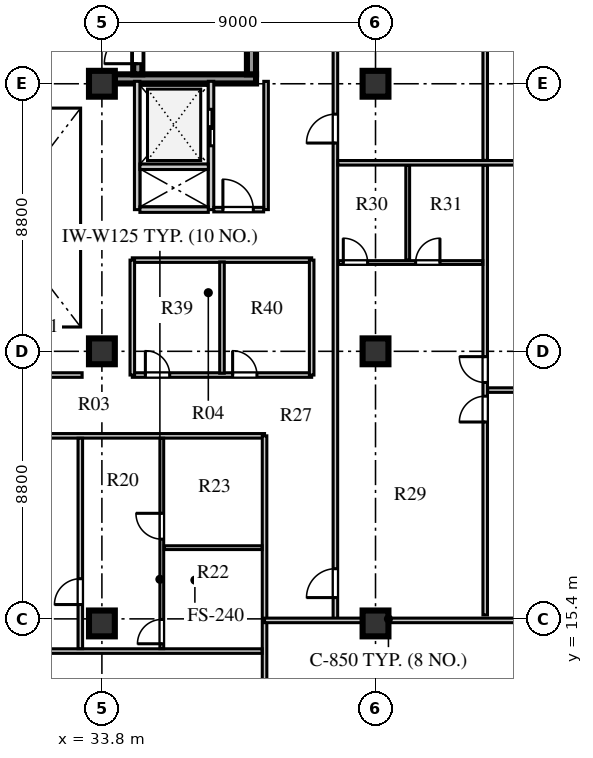
"""IFC4 building model, lengths in metres.
Left out: names, types, materials, properties, quantities, classifications, styles, units other than length and angle.
Written with IfcOpenShell. Run it as: python <this file> out.ifc"""

import sys

from ifc_helpers import new_model, si_unit, direction, frame, frame_2d, origin, origin_2d, place, context, subcontext, project, spatial, rectangle, extrude, element, fill, save


model = new_model("IFC4")
c1 = context("Model", 3, precision=1e-05, world=origin(), true_north=direction((0.0, 1.0)))
c2 = subcontext(c1, "Body", "Model", "MODEL_VIEW")
j1 = project(units=[si_unit("LENGTHUNIT", "METRE"), si_unit("PLANEANGLEUNIT", "RADIAN")], contexts=[c1])
p1 = place(None, origin())
s1 = spatial("IfcSite", under=j1, at=p1, CompositionType="ELEMENT")
p2 = place(p1, origin())
s2 = spatial("IfcBuilding", under=s1, at=p2, CompositionType="ELEMENT")
p3 = place(p2, frame((0.0, 0.0, 245.3)))
s3 = spatial("IfcBuildingStorey", under=s2, at=p3, CompositionType="ELEMENT", Elevation=245.3)
p4 = place(p3, frame((34.225, 33.16, 0.0), z_axis=(0.0, 0.0, 1.0), x_axis=(1.0, 0.0, 0.0)))
e1 = element("IfcWall", 1, at=p4, inside=s3, PredefinedType="SHEAR", context=c2, shape_type="SweptSolid", body=[
    extrude(rectangle(XDim=4.645, YDim=0.3, at=frame_2d((2.323, 0.0))), origin(), (0.0, 0.0, 1.0), 3.66),
])
p5 = place(p3, frame((34.98, 33.31, 0.0), z_axis=(0.0, 0.0, 1.0), x_axis=(0.0, 1.0, 0.0)))
e2 = element("IfcWall", 2, at=p5, inside=s3, PredefinedType="SHEAR", context=c2, shape_type="SweptSolid", body=[
    extrude(rectangle(XDim=8.03, YDim=0.3, at=frame_2d((4.015, 0.0))), origin(), (0.0, 0.0, 1.0), 3.66),
])
p6 = place(p5, frame((0.35, 0.0, 0.0)))
e3 = element("IfcOpeningElement", 3, at=p6, cuts=e2, PredefinedType="OPENING", context=c2, shape_type="SweptSolid", body=[
    extrude(rectangle(XDim=1.1, YDim=2.1, at=frame_2d((0.55, 1.05))), frame((0.0, 0.16, 0.0), z_axis=(0.0, -1.0, 0.0), x_axis=(1.0, 0.0, 0.0)), (0.0, 0.0, 1.0), 0.32),
])
p7 = place(p3, frame((38.72, 33.31, 0.0), z_axis=(0.0, 0.0, 1.0), x_axis=(0.0, 1.0, 0.0)))
e4 = element("IfcWall", 4, at=p7, inside=s3, PredefinedType="SHEAR", context=c2, shape_type="SweptSolid", body=[
    extrude(rectangle(XDim=8.03, YDim=0.3, at=frame_2d((4.015, 0.0))), origin(), (0.0, 0.0, 1.0), 3.66),
])
for number, where, z_axis, x_axis in (
    (5, (33.8, 15.25, 0.0), (0.0, 0.0, 1.0), (1.0, 0.0, 0.0)),
    (6, (33.8, 24.2, 0.0), (0.0, 0.0, 1.0), (1.0, 0.0, 0.0)),
    (7, (33.8, 33.0, 0.0), (0.0, 0.0, 1.0), (1.0, 0.0, 0.0)),
    (8, (42.8, 15.25, 0.0), (0.0, 0.0, 1.0), (1.0, 0.0, 0.0)),
    (9, (42.8, 24.2, 0.0), (0.0, 0.0, 1.0), (1.0, 0.0, 0.0)),
    (10, (42.8, 33.0, 0.0), (0.0, 0.0, 1.0), (1.0, 0.0, 0.0)),
):
    element("IfcColumn", number, at=place(p3, frame(where, z_axis=z_axis, x_axis=x_axis)), inside=s3, PredefinedType="COLUMN", context=c2, shape_type="SweptSolid", body=[
        extrude(rectangle(XDim=0.85, YDim=0.85, at=origin_2d()), origin(), (0.0, 0.0, 1.0), 3.66),
    ])
p8 = place(p3, frame((34.96, 28.86, 0.0), z_axis=(0.0, 0.0, 1.0), x_axis=(0.0, 1.0, 0.0)))
e11 = element("IfcWall", 11, at=p8, inside=s3, PredefinedType="SOLIDWALL", context=c2, shape_type="SweptSolid", body=[
    extrude(rectangle(XDim=4.22, YDim=0.18, at=frame_2d((2.11, 0.0))), origin(), (0.0, 0.0, 1.0), 3.66),
])
p9 = place(p3, frame((37.39, 28.86, 0.0), z_axis=(0.0, 0.0, 1.0), x_axis=(0.0, 1.0, 0.0)))
e12 = element("IfcWall", 12, at=p9, inside=s3, PredefinedType="SOLIDWALL", context=c2, shape_type="SweptSolid", body=[
    extrude(rectangle(XDim=4.22, YDim=0.18, at=frame_2d((2.11, 0.0))), origin(), (0.0, 0.0, 1.0), 3.66),
])
p10 = place(p9, frame((2.1, 0.0, 0.0)))
e13 = element("IfcOpeningElement", 13, at=p10, cuts=e12, PredefinedType="OPENING", context=c2, shape_type="SweptSolid", body=[
    extrude(rectangle(XDim=1.2, YDim=2.12, at=frame_2d((0.6, 1.06))), frame((0.0, 0.1, 0.0), z_axis=(0.0, -1.0, 0.0), x_axis=(1.0, 0.0, 0.0)), (0.0, 0.0, 1.0), 0.2),
])
for number, where, z_axis, x_axis in (
    (14, (35.05, 28.86, 0.0), (0.0, 0.0, 1.0), (1.0, 0.0, 0.0)),
    (15, (35.05, 30.27, 0.0), (0.0, 0.0, 1.0), (1.0, 0.0, 0.0)),
):
    element("IfcWall", number, at=place(p3, frame(where, z_axis=z_axis, x_axis=x_axis)), inside=s3, PredefinedType="SOLIDWALL", context=c2, shape_type="SweptSolid", body=[
        extrude(rectangle(XDim=2.25, YDim=0.18, at=frame_2d((1.125, 0.0))), origin(), (0.0, 0.0, 1.0), 3.66),
    ])
p11 = place(p3, frame((39.2, 28.86, 0.0), z_axis=(0.0, 0.0, 1.0), x_axis=(0.0, 1.0, 0.0)))
e16 = element("IfcWall", 16, at=p11, inside=s3, PredefinedType="PARTITIONING", context=c2, shape_type="SweptSolid", body=[
    extrude(rectangle(XDim=4.22, YDim=0.15, at=frame_2d((2.11, 0.0))), origin(), (0.0, 0.0, 1.0), 3.66),
])
p12 = place(p3, frame((37.48, 28.86, 0.0), z_axis=(0.0, 0.0, 1.0), x_axis=(1.0, 0.0, 0.0)))
e17 = element("IfcWall", 17, at=p12, inside=s3, PredefinedType="PARTITIONING", context=c2, shape_type="SweptSolid", body=[
    extrude(rectangle(XDim=1.64, YDim=0.15, at=frame_2d((0.82, 0.0))), origin(), (0.0, 0.0, 1.0), 3.66),
])
p13 = place(p12, frame((0.3, 0.0, 0.0)))
e18 = element("IfcOpeningElement", 18, at=p13, cuts=e17, PredefinedType="OPENING", context=c2, shape_type="SweptSolid", body=[
    extrude(rectangle(XDim=1.0, YDim=2.1, at=frame_2d((0.5, 1.05))), frame((0.0, 0.085, 0.0), z_axis=(0.0, -1.0, 0.0), x_axis=(1.0, 0.0, 0.0)), (0.0, 0.0, 1.0), 0.17),
])
p14 = place(p3, frame((27.08, 21.42, 0.0), z_axis=(0.0, 0.0, 1.0), x_axis=(1.0, 0.0, 0.0)))
e19 = element("IfcWall", 19, at=p14, inside=s3, PredefinedType="PARTITIONING", context=c2, shape_type="SweptSolid", body=[
    extrude(rectangle(XDim=12.07, YDim=0.15, at=frame_2d((6.035, 0.0))), origin(), (0.0, 0.0, 1.0), 3.31),
])
p15 = place(p14, frame((0.63, 0.0, 0.0)))
e20 = element("IfcOpeningElement", 20, at=p15, cuts=e19, PredefinedType="OPENING", context=c2, shape_type="SweptSolid", body=[
    extrude(rectangle(XDim=0.95, YDim=2.1, at=frame_2d((0.475, 1.05))), frame((0.0, 0.085, 0.0), z_axis=(0.0, -1.0, 0.0), x_axis=(1.0, 0.0, 0.0)), (0.0, 0.0, 1.0), 0.17),
])
p16 = place(p3, frame((27.15, 23.42, 0.0), z_axis=(0.0, 0.0, 1.0), x_axis=(1.0, 0.0, 0.0)))
e21 = element("IfcWall", 21, at=p16, inside=s3, PredefinedType="PARTITIONING", context=c2, shape_type="SweptSolid", body=[
    extrude(rectangle(XDim=6.0, YDim=0.15, at=frame_2d((3.0, 0.0))), origin(), (0.0, 0.0, 1.0), 3.66),
])
p17 = place(p3, frame((39.15, 7.88, 0.0), z_axis=(0.0, 0.0, 1.0), x_axis=(0.0, 1.0, 0.0)))
e22 = element("IfcWall", 22, at=p17, inside=s3, PredefinedType="PARTITIONING", context=c2, shape_type="SweptSolid", body=[
    extrude(rectangle(XDim=13.54, YDim=0.15, at=frame_2d((6.77, 0.0))), origin(), (0.0, 0.0, 1.0), 3.66),
])
p18 = place(p3, frame((27.24, 14.341, 0.0), z_axis=(0.0, 0.0, 1.0), x_axis=(1.0, 0.0, 0.0)))
e23 = element("IfcWall", 23, at=p18, inside=s3, PredefinedType="PARTITIONING", context=c2, shape_type="SweptSolid", body=[
    extrude(rectangle(XDim=11.83, YDim=0.15, at=frame_2d((5.915, 0.0))), origin(), (0.0, 0.0, 1.0), 3.66),
])
p19 = place(p18, frame((0.3, 0.0, 0.0)))
e24 = element("IfcOpeningElement", 24, at=p19, cuts=e23, PredefinedType="OPENING", context=c2, shape_type="SweptSolid", body=[
    extrude(rectangle(XDim=0.85, YDim=2.08, at=frame_2d((0.425, 1.04))), frame((0.0, 0.085, 0.0), z_axis=(0.0, -1.0, 0.0), x_axis=(1.0, 0.0, 0.0)), (0.0, 0.0, 1.0), 0.17),
])
p20 = place(p18, frame((3.135, 0.0, 0.0)))
e25 = element("IfcOpeningElement", 25, at=p20, cuts=e23, PredefinedType="OPENING", context=c2, shape_type="SweptSolid", body=[
    extrude(rectangle(XDim=0.85, YDim=2.08, at=frame_2d((0.425, 1.04))), frame((0.0, 0.085, 0.0), z_axis=(0.0, -1.0, 0.0), x_axis=(1.0, 0.0, 0.0)), (0.0, 0.0, 1.0), 0.17),
])
p21 = place(p3, frame((35.77, 14.421, 0.0), z_axis=(0.0, 0.0, 1.0), x_axis=(0.0, 1.0, 0.0)))
e26 = element("IfcWall", 26, at=p21, inside=s3, PredefinedType="PLUMBINGWALL", context=c2, shape_type="SweptSolid", body=[
    extrude(rectangle(XDim=6.919, YDim=0.125, at=frame_2d((3.459, 0.0))), origin(), (0.0, 0.0, 1.0), 3.66),
])
p22 = place(p21, frame((0.16, 0.0, 0.0)))
e27 = element("IfcOpeningElement", 27, at=p22, cuts=e26, PredefinedType="OPENING", context=c2, shape_type="SweptSolid", body=[
    extrude(rectangle(XDim=0.8, YDim=2.05, at=frame_2d((0.4, 1.025))), frame((0.0, 0.073, 0.0), z_axis=(0.0, -1.0, 0.0), x_axis=(1.0, 0.0, 0.0)), (0.0, 0.0, 1.0), 0.145),
])
p23 = place(p21, frame((3.601, 0.0, 0.0)))
e28 = element("IfcOpeningElement", 28, at=p23, cuts=e26, PredefinedType="OPENING", context=c2, shape_type="SweptSolid", body=[
    extrude(rectangle(XDim=0.85, YDim=2.08, at=frame_2d((0.425, 1.04))), frame((0.0, 0.073, 0.0), z_axis=(0.0, -1.0, 0.0), x_axis=(1.0, 0.0, 0.0)), (0.0, 0.0, 1.0), 0.145),
])
p24 = place(p3, frame((35.85, 17.742, 0.0), z_axis=(0.0, 0.0, 1.0), x_axis=(1.0, 0.0, 0.0)))
e29 = element("IfcWall", 29, at=p24, inside=s3, PredefinedType="PLUMBINGWALL", context=c2, shape_type="SweptSolid", body=[
    extrude(rectangle(XDim=3.22, YDim=0.125, at=frame_2d((1.61, 0.0))), origin(), (0.0, 0.0, 1.0), 3.66),
])
p25 = place(p3, frame((33.09, 14.421, 0.0), z_axis=(0.0, 0.0, 1.0), x_axis=(0.0, 1.0, 0.0)))
e30 = element("IfcWall", 30, at=p25, inside=s3, PredefinedType="PARTITIONING", context=c2, shape_type="SweptSolid", body=[
    extrude(rectangle(XDim=6.919, YDim=0.15, at=frame_2d((3.459, 0.0))), origin(), (0.0, 0.0, 1.0), 3.66),
])
p26 = place(p25, frame((1.45, 0.0, 0.0)))
e31 = element("IfcOpeningElement", 31, at=p26, cuts=e30, PredefinedType="OPENING", context=c2, shape_type="SweptSolid", body=[
    extrude(rectangle(XDim=0.85, YDim=2.08, at=frame_2d((0.425, 1.04))), frame((0.0, 0.085, 0.0), z_axis=(0.0, -1.0, 0.0), x_axis=(1.0, 0.0, 0.0)), (0.0, 0.0, 1.0), 0.17),
])
p27 = place(p3, frame((41.48, 15.35, 0.0), z_axis=(0.0, 0.0, 1.0), x_axis=(0.0, 1.0, 0.0)))
e32 = element("IfcWall", 32, at=p27, inside=s3, PredefinedType="PARTITIONING", context=c2, shape_type="SweptSolid", body=[
    extrude(rectangle(XDim=26.5, YDim=0.15, at=frame_2d((13.25, 0.0))), origin(), (0.0, 0.0, 1.0), 3.66),
])
p28 = place(p27, frame((0.75, 0.0, 0.0)))
e33 = element("IfcOpeningElement", 33, at=p28, cuts=e32, PredefinedType="OPENING", context=c2, shape_type="SweptSolid", body=[
    extrude(rectangle(XDim=0.95, YDim=2.1, at=frame_2d((0.475, 1.05))), frame((0.0, 0.085, 0.0), z_axis=(0.0, -1.0, 0.0), x_axis=(1.0, 0.0, 0.0)), (0.0, 0.0, 1.0), 0.17),
])
p29 = place(p27, frame((15.7, 0.0, 0.0)))
e34 = element("IfcOpeningElement", 34, at=p29, cuts=e32, PredefinedType="OPENING", context=c2, shape_type="SweptSolid", body=[
    extrude(rectangle(XDim=0.95, YDim=2.1, at=frame_2d((0.475, 1.05))), frame((0.0, 0.085, 0.0), z_axis=(0.0, -1.0, 0.0), x_axis=(1.0, 0.0, 0.0)), (0.0, 0.0, 1.0), 0.17),
])
p30 = place(p3, frame((39.15, 15.35, 0.0), z_axis=(0.0, 0.0, 1.0), x_axis=(1.0, 0.0, 0.0)))
e35 = element("IfcWall", 35, at=p30, inside=s3, PredefinedType="PARTITIONING", context=c2, shape_type="SweptSolid", body=[
    extrude(rectangle(XDim=11.37, YDim=0.15, at=frame_2d((5.685, 0.0))), origin(), (0.0, 0.0, 1.0), 3.06),
])
p31 = place(p3, frame((46.408, 15.53, 0.0), z_axis=(0.0, 0.0, 1.0), x_axis=(0.0, 1.0, 0.0)))
e36 = element("IfcWall", 36, at=p31, inside=s3, PredefinedType="PARTITIONING", context=c2, shape_type="SweptSolid", body=[
    extrude(rectangle(XDim=14.79, YDim=0.15, at=frame_2d((7.395, 0.0))), origin(), (0.0, 0.0, 1.0), 3.66),
])
p32 = place(p31, frame((6.345, 0.0, 0.0)))
e37 = element("IfcOpeningElement", 37, at=p32, cuts=e36, PredefinedType="OPENING", context=c2, shape_type="SweptSolid", body=[
    extrude(rectangle(XDim=0.85, YDim=2.08, at=frame_2d((0.425, 1.04))), frame((0.0, 0.085, 0.0), z_axis=(0.0, -1.0, 0.0), x_axis=(1.0, 0.0, 0.0)), (0.0, 0.0, 1.0), 0.17),
])
p33 = place(p31, frame((7.645, 0.0, 0.0)))
e38 = element("IfcOpeningElement", 38, at=p33, cuts=e36, PredefinedType="OPENING", context=c2, shape_type="SweptSolid", body=[
    extrude(rectangle(XDim=0.85, YDim=2.08, at=frame_2d((0.425, 1.04))), frame((0.0, 0.085, 0.0), z_axis=(0.0, -1.0, 0.0), x_axis=(1.0, 0.0, 0.0)), (0.0, 0.0, 1.0), 0.17),
])
p34 = place(p3, frame((41.58, 27.12, 0.0), z_axis=(0.0, 0.0, 1.0), x_axis=(1.0, 0.0, 0.0)))
e39 = element("IfcWall", 39, at=p34, inside=s3, PredefinedType="PLUMBINGWALL", context=c2, shape_type="SweptSolid", body=[
    extrude(rectangle(XDim=4.748, YDim=0.125, at=frame_2d((2.374, 0.0))), origin(), (0.0, 0.0, 1.0), 3.31),
])
p35 = place(p34, frame((0.16, 0.0, 0.0)))
e40 = element("IfcOpeningElement", 40, at=p35, cuts=e39, PredefinedType="OPENING", context=c2, shape_type="SweptSolid", body=[
    extrude(rectangle(XDim=0.8, YDim=2.05, at=frame_2d((0.4, 1.025))), frame((0.0, 0.073, 0.0), z_axis=(0.0, -1.0, 0.0), x_axis=(1.0, 0.0, 0.0)), (0.0, 0.0, 1.0), 0.145),
])
p36 = place(p34, frame((2.539, 0.0, 0.0)))
e41 = element("IfcOpeningElement", 41, at=p36, cuts=e39, PredefinedType="OPENING", context=c2, shape_type="SweptSolid", body=[
    extrude(rectangle(XDim=0.8, YDim=2.05, at=frame_2d((0.4, 1.025))), frame((0.0, 0.073, 0.0), z_axis=(0.0, -1.0, 0.0), x_axis=(1.0, 0.0, 0.0)), (0.0, 0.0, 1.0), 0.145),
])
p37 = place(p3, frame((43.859, 27.2, 0.0), z_axis=(0.0, 0.0, 1.0), x_axis=(0.0, 1.0, 0.0)))
e42 = element("IfcWall", 42, at=p37, inside=s3, PredefinedType="PLUMBINGWALL", context=c2, shape_type="SweptSolid", body=[
    extrude(rectangle(XDim=3.12, YDim=0.125, at=frame_2d((1.56, 0.0))), origin(), (0.0, 0.0, 1.0), 3.66),
])
p38 = place(p3, frame((46.488, 22.925, 0.0), z_axis=(0.0, 0.0, 1.0), x_axis=(1.0, 0.0, 0.0)))
e43 = element("IfcWall", 43, at=p38, inside=s3, PredefinedType="PARTITIONING", context=c2, shape_type="SweptSolid", body=[
    extrude(rectangle(XDim=4.032, YDim=0.15, at=frame_2d((2.016, 0.0))), origin(), (0.0, 0.0, 1.0), 3.66),
])
p39 = place(p3, frame((41.56, 30.4, 0.0), z_axis=(0.0, 0.0, 1.0), x_axis=(1.0, 0.0, 0.0)))
e44 = element("IfcWall", 44, at=p39, inside=s3, PredefinedType="PARTITIONING", context=c2, shape_type="SweptSolid", body=[
    extrude(rectangle(XDim=8.96, YDim=0.15, at=frame_2d((4.48, 0.0))), origin(), (0.0, 0.0, 1.0), 3.66),
])
p40 = place(p3, frame((46.408, 30.48, 0.0), z_axis=(0.0, 0.0, 1.0), x_axis=(0.0, 1.0, 0.0)))
e45 = element("IfcWall", 45, at=p40, inside=s3, PredefinedType="PARTITIONING", context=c2, shape_type="SweptSolid", body=[
    extrude(rectangle(XDim=11.19, YDim=0.15, at=frame_2d((5.595, 0.0))), origin(), (0.0, 0.0, 1.0), 3.66),
])
p41 = place(p40, frame((4.545, 0.0, 0.0)))
e46 = element("IfcOpeningElement", 46, at=p41, cuts=e45, PredefinedType="OPENING", context=c2, shape_type="SweptSolid", body=[
    extrude(rectangle(XDim=0.85, YDim=2.08, at=frame_2d((0.425, 1.04))), frame((0.0, 0.085, 0.0), z_axis=(0.0, -1.0, 0.0), x_axis=(1.0, 0.0, 0.0)), (0.0, 0.0, 1.0), 0.17),
])
p42 = place(p40, frame((5.845, 0.0, 0.0)))
e47 = element("IfcOpeningElement", 47, at=p42, cuts=e45, PredefinedType="OPENING", context=c2, shape_type="SweptSolid", body=[
    extrude(rectangle(XDim=0.85, YDim=2.08, at=frame_2d((0.425, 1.04))), frame((0.0, 0.085, 0.0), z_axis=(0.0, -1.0, 0.0), x_axis=(1.0, 0.0, 0.0)), (0.0, 0.0, 1.0), 0.17),
])
p43 = place(p3, frame((34.8, 23.42, 0.0), z_axis=(0.0, 0.0, 1.0), x_axis=(1.0, 0.0, 0.0)))
e48 = element("IfcWall", 48, at=p43, inside=s3, PredefinedType="PARTITIONING", context=c2, shape_type="SweptSolid", body=[
    extrude(rectangle(XDim=5.9, YDim=0.15, at=frame_2d((2.95, 0.0))), origin(), (0.0, 0.0, 1.0), 3.66),
])
p44 = place(p43, frame((0.43, 0.0, 0.0)))
e49 = element("IfcOpeningElement", 49, at=p44, cuts=e48, PredefinedType="OPENING", context=c2, shape_type="SweptSolid", body=[
    extrude(rectangle(XDim=0.8, YDim=2.05, at=frame_2d((0.4, 1.025))), frame((0.0, 0.085, 0.0), z_axis=(0.0, -1.0, 0.0), x_axis=(1.0, 0.0, 0.0)), (0.0, 0.0, 1.0), 0.17),
])
p45 = place(p43, frame((3.3, 0.0, 0.0)))
e50 = element("IfcOpeningElement", 50, at=p45, cuts=e48, PredefinedType="OPENING", context=c2, shape_type="SweptSolid", body=[
    extrude(rectangle(XDim=0.8, YDim=2.05, at=frame_2d((0.4, 1.025))), frame((0.0, 0.085, 0.0), z_axis=(0.0, -1.0, 0.0), x_axis=(1.0, 0.0, 0.0)), (0.0, 0.0, 1.0), 0.17),
])
p46 = place(p3, frame((34.8, 27.2, 0.0), z_axis=(0.0, 0.0, 1.0), x_axis=(1.0, 0.0, 0.0)))
e51 = element("IfcWall", 51, at=p46, inside=s3, PredefinedType="PARTITIONING", context=c2, shape_type="SweptSolid", body=[
    extrude(rectangle(XDim=5.9, YDim=0.15, at=frame_2d((2.95, 0.0))), origin(), (0.0, 0.0, 1.0), 3.31),
])
for number, where, z_axis, x_axis in (
    (52, (34.8, 23.42, 0.0), (0.0, 0.0, 1.0), (0.0, 1.0, 0.0)),
    (53, (40.7, 23.42, 0.0), (0.0, 0.0, 1.0), (0.0, 1.0, 0.0)),
):
    element("IfcWall", number, at=place(p3, frame(where, z_axis=z_axis, x_axis=x_axis)), inside=s3, PredefinedType="PARTITIONING", context=c2, shape_type="SweptSolid", body=[
        extrude(rectangle(XDim=3.78, YDim=0.15, at=frame_2d((1.89, 0.0))), origin(), (0.0, 0.0, 1.0), 3.66),
    ])
p47 = place(p3, frame((37.75, 23.48, 0.0), z_axis=(0.0, 0.0, 1.0), x_axis=(0.0, 1.0, 0.0)))
e54 = element("IfcWall", 54, at=p47, inside=s3, PredefinedType="PARTITIONING", context=c2, shape_type="SweptSolid", body=[
    extrude(rectangle(XDim=3.66, YDim=0.15, at=frame_2d((1.83, 0.0))), origin(), (0.0, 0.0, 1.0), 3.66),
])
p48 = place(p6, origin())
e55 = element("IfcDoor", 55, at=p48, inside=s3, OperationType="SINGLE_SWING_LEFT", PredefinedType="DOOR", context=c2, shape_type="SweptSolid", body=[
    extrude(rectangle(XDim=1.1, YDim=2.1, at=frame_2d((0.55, 1.05))), frame((0.0, 0.025, 0.0), z_axis=(0.0, -1.0, 0.0), x_axis=(1.0, 0.0, 0.0)), (0.0, 0.0, 1.0), 0.05),
])
fill(e3, e55)
p49 = place(p10, frame((1.2, 0.0, 0.0), z_axis=(0.0, 0.0, 1.0), x_axis=(-1.0, 0.0, 0.0)))
e56 = element("IfcDoor", 56, at=p49, inside=s3, OperationType="DOUBLE_DOOR_SLIDING", PredefinedType="DOOR", context=c2, shape_type="SweptSolid", body=[
    extrude(rectangle(XDim=1.2, YDim=2.12, at=frame_2d((0.6, 1.06))), frame((0.0, 0.025, 0.0), z_axis=(0.0, -1.0, 0.0), x_axis=(1.0, 0.0, 0.0)), (0.0, 0.0, 1.0), 0.05),
])
fill(e13, e56)
p50 = place(p13, origin())
e57 = element("IfcDoor", 57, at=p50, inside=s3, OperationType="SINGLE_SWING_LEFT", PredefinedType="DOOR", context=c2, shape_type="SweptSolid", body=[
    extrude(rectangle(XDim=1.0, YDim=2.1, at=frame_2d((0.5, 1.05))), frame((0.0, 0.025, 0.0), z_axis=(0.0, -1.0, 0.0), x_axis=(1.0, 0.0, 0.0)), (0.0, 0.0, 1.0), 0.05),
])
fill(e18, e57)
p51 = place(p26, origin())
e58 = element("IfcDoor", 58, at=p51, inside=s3, OperationType="SINGLE_SWING_LEFT", PredefinedType="DOOR", context=c2, shape_type="SweptSolid", body=[
    extrude(rectangle(XDim=0.85, YDim=2.08, at=frame_2d((0.425, 1.04))), frame((0.0, 0.025, 0.0), z_axis=(0.0, -1.0, 0.0), x_axis=(1.0, 0.0, 0.0)), (0.0, 0.0, 1.0), 0.05),
])
fill(e31, e58)
p52 = place(p22, origin())
e59 = element("IfcDoor", 59, at=p52, inside=s3, OperationType="SINGLE_SWING_LEFT", PredefinedType="DOOR", context=c2, shape_type="SweptSolid", body=[
    extrude(rectangle(XDim=0.8, YDim=2.05, at=frame_2d((0.4, 1.025))), frame((0.0, 0.025, 0.0), z_axis=(0.0, -1.0, 0.0), x_axis=(1.0, 0.0, 0.0)), (0.0, 0.0, 1.0), 0.05),
])
fill(e27, e59)
p53 = place(p23, origin())
e60 = element("IfcDoor", 60, at=p53, inside=s3, OperationType="SINGLE_SWING_RIGHT", PredefinedType="DOOR", context=c2, shape_type="SweptSolid", body=[
    extrude(rectangle(XDim=0.85, YDim=2.08, at=frame_2d((0.425, 1.04))), frame((0.0, 0.025, 0.0), z_axis=(0.0, -1.0, 0.0), x_axis=(1.0, 0.0, 0.0)), (0.0, 0.0, 1.0), 0.05),
])
fill(e28, e60)
p54 = place(p35, origin())
e61 = element("IfcDoor", 61, at=p54, inside=s3, OperationType="SINGLE_SWING_LEFT", PredefinedType="DOOR", context=c2, shape_type="SweptSolid", body=[
    extrude(rectangle(XDim=0.8, YDim=2.05, at=frame_2d((0.4, 1.025))), frame((0.0, 0.025, 0.0), z_axis=(0.0, -1.0, 0.0), x_axis=(1.0, 0.0, 0.0)), (0.0, 0.0, 1.0), 0.05),
])
fill(e40, e61)
p55 = place(p36, origin())
e62 = element("IfcDoor", 62, at=p55, inside=s3, OperationType="SINGLE_SWING_RIGHT", PredefinedType="DOOR", context=c2, shape_type="SweptSolid", body=[
    extrude(rectangle(XDim=0.8, YDim=2.05, at=frame_2d((0.4, 1.025))), frame((0.0, 0.025, 0.0), z_axis=(0.0, -1.0, 0.0), x_axis=(1.0, 0.0, 0.0)), (0.0, 0.0, 1.0), 0.05),
])
fill(e41, e62)
p56 = place(p32, origin())
e63 = element("IfcDoor", 63, at=p56, inside=s3, OperationType="SINGLE_SWING_LEFT", PredefinedType="DOOR", context=c2, shape_type="SweptSolid", body=[
    extrude(rectangle(XDim=0.85, YDim=2.08, at=frame_2d((0.425, 1.04))), frame((0.0, 0.025, 0.0), z_axis=(0.0, -1.0, 0.0), x_axis=(1.0, 0.0, 0.0)), (0.0, 0.0, 1.0), 0.05),
])
fill(e37, e63)
p57 = place(p33, origin())
e64 = element("IfcDoor", 64, at=p57, inside=s3, OperationType="SINGLE_SWING_RIGHT", PredefinedType="DOOR", context=c2, shape_type="SweptSolid", body=[
    extrude(rectangle(XDim=0.85, YDim=2.08, at=frame_2d((0.425, 1.04))), frame((0.0, 0.025, 0.0), z_axis=(0.0, -1.0, 0.0), x_axis=(1.0, 0.0, 0.0)), (0.0, 0.0, 1.0), 0.05),
])
fill(e38, e64)
p58 = place(p28, origin())
e65 = element("IfcDoor", 65, at=p58, inside=s3, OperationType="SINGLE_SWING_LEFT", PredefinedType="DOOR", context=c2, shape_type="SweptSolid", body=[
    extrude(rectangle(XDim=0.95, YDim=2.1, at=frame_2d((0.475, 1.05))), frame((0.0, 0.025, 0.0), z_axis=(0.0, -1.0, 0.0), x_axis=(1.0, 0.0, 0.0)), (0.0, 0.0, 1.0), 0.05),
])
fill(e33, e65)
p59 = place(p29, origin())
e66 = element("IfcDoor", 66, at=p59, inside=s3, OperationType="SINGLE_SWING_LEFT", PredefinedType="DOOR", context=c2, shape_type="SweptSolid", body=[
    extrude(rectangle(XDim=0.95, YDim=2.1, at=frame_2d((0.475, 1.05))), frame((0.0, 0.025, 0.0), z_axis=(0.0, -1.0, 0.0), x_axis=(1.0, 0.0, 0.0)), (0.0, 0.0, 1.0), 0.05),
])
fill(e34, e66)
p60 = place(p44, origin())
e67 = element("IfcDoor", 67, at=p60, inside=s3, OperationType="SINGLE_SWING_LEFT", PredefinedType="DOOR", context=c2, shape_type="SweptSolid", body=[
    extrude(rectangle(XDim=0.8, YDim=2.05, at=frame_2d((0.4, 1.025))), frame((0.0, 0.025, 0.0), z_axis=(0.0, -1.0, 0.0), x_axis=(1.0, 0.0, 0.0)), (0.0, 0.0, 1.0), 0.05),
])
fill(e49, e67)
p61 = place(p45, origin())
e68 = element("IfcDoor", 68, at=p61, inside=s3, OperationType="SINGLE_SWING_LEFT", PredefinedType="DOOR", context=c2, shape_type="SweptSolid", body=[
    extrude(rectangle(XDim=0.8, YDim=2.05, at=frame_2d((0.4, 1.025))), frame((0.0, 0.025, 0.0), z_axis=(0.0, -1.0, 0.0), x_axis=(1.0, 0.0, 0.0)), (0.0, 0.0, 1.0), 0.05),
])
fill(e50, e68)
save(model, sys.argv[1])
